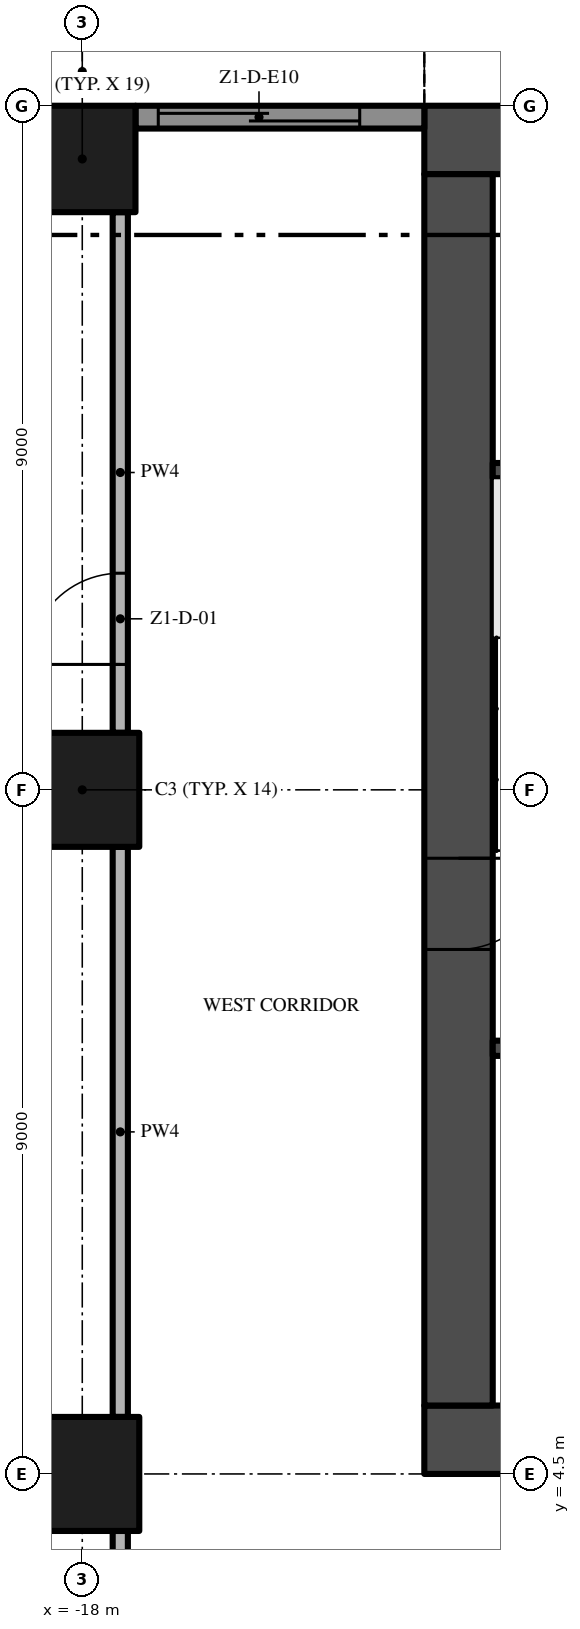
"""IFC4 building model, lengths in metres.
Left out: names, types, materials, properties, quantities, classifications, styles, units other than length and angle.
Written with IfcOpenShell. Run it as: python <this file> out.ifc"""

import sys

from ifc_helpers import new_model, si_unit, direction, frame, frame_2d, origin, origin_2d, place, context, subcontext, project, spatial, polyline, rectangle, outline, extrude, element, fill, save


model = new_model("IFC4")
c1 = context("Model", 3, precision=1e-05, world=origin(), true_north=direction((0.0, 1.0)))
c2 = subcontext(c1, "Body", "Model", "MODEL_VIEW")
j1 = project(units=[si_unit("LENGTHUNIT", "METRE"), si_unit("PLANEANGLEUNIT", "RADIAN")], contexts=[c1])
p1 = place(None, origin())
s1 = spatial("IfcSite", under=j1, at=p1, CompositionType="ELEMENT")
p2 = place(p1, origin())
s2 = spatial("IfcBuilding", under=s1, at=p2, CompositionType="ELEMENT")
p3 = place(p2, frame((0.0, 0.0, 49.2)))
s3 = spatial("IfcBuildingStorey", under=s2, at=p3, CompositionType="ELEMENT", Elevation=49.2)
p4 = place(p3, frame((-13.5, 4.95, -0.3), z_axis=(0.0, 0.0, 1.0), x_axis=(1.0, 0.0, 0.0)))
e1 = element("IfcWall", 1, at=p4, inside=s3, PredefinedType="SHEAR", context=c2, shape_type="SweptSolid", body=[
    extrude(rectangle(XDim=27.0, YDim=0.9, at=frame_2d((13.5, 0.0))), origin(), (0.0, 0.0, 1.0), 3.8),
])
p5 = place(p4, frame((12.0, 0.0, 0.3)))
e2 = element("IfcOpeningElement", 2, at=p5, cuts=e1, PredefinedType="OPENING", context=c2, shape_type="SweptSolid", body=[
    extrude(rectangle(XDim=3.0, YDim=2.4, at=frame_2d((1.5, 1.2))), frame((0.0, 0.46, 0.0), z_axis=(0.0, -1.0, 0.0), x_axis=(1.0, 0.0, 0.0)), (0.0, 0.0, 1.0), 0.92),
])
p6 = place(p4, frame((4.9, 0.0, 0.3)))
e3 = element("IfcOpeningElement", 3, at=p6, cuts=e1, PredefinedType="OPENING", context=c2, shape_type="SweptSolid", body=[
    extrude(rectangle(XDim=1.2, YDim=2.2, at=frame_2d((0.6, 1.1))), frame((0.0, 0.46, 0.0), z_axis=(0.0, -1.0, 0.0), x_axis=(1.0, 0.0, 0.0)), (0.0, 0.0, 1.0), 0.92),
])
p7 = place(p4, frame((20.75, 0.0, 0.3)))
e4 = element("IfcOpeningElement", 4, at=p7, cuts=e1, PredefinedType="OPENING", context=c2, shape_type="SweptSolid", body=[
    extrude(rectangle(XDim=1.5, YDim=2.2, at=frame_2d((0.75, 1.1))), frame((0.0, 0.46, 0.0), z_axis=(0.0, -1.0, 0.0), x_axis=(1.0, 0.0, 0.0)), (0.0, 0.0, 1.0), 0.92),
])
p8 = place(p4, frame((17.4, 0.0, 0.3)))
e5 = element("IfcOpeningElement", 5, at=p8, cuts=e1, PredefinedType="OPENING", context=c2, shape_type="SweptSolid", body=[
    extrude(rectangle(XDim=1.2, YDim=2.2, at=frame_2d((0.6, 1.1))), frame((0.0, 0.46, 0.0), z_axis=(0.0, -1.0, 0.0), x_axis=(1.0, 0.0, 0.0)), (0.0, 0.0, 1.0), 0.92),
])
p9 = place(p3, frame((13.5, 22.05, -0.3), z_axis=(0.0, 0.0, 1.0), x_axis=(-1.0, 0.0, 0.0)))
e6 = element("IfcWall", 6, at=p9, inside=s3, PredefinedType="SHEAR", context=c2, shape_type="SweptSolid", body=[
    extrude(rectangle(XDim=27.0, YDim=0.9, at=frame_2d((13.5, 0.0))), origin(), (0.0, 0.0, 1.0), 3.8),
])
p10 = place(p3, frame((-13.05, 21.6, -0.3), z_axis=(0.0, 0.0, 1.0), x_axis=(0.0, -1.0, 0.0)))
e7 = element("IfcWall", 7, at=p10, inside=s3, PredefinedType="SHEAR", context=c2, shape_type="SweptSolid", body=[
    extrude(rectangle(XDim=16.2, YDim=0.9, at=frame_2d((8.1, 0.0))), origin(), (0.0, 0.0, 1.0), 3.8),
])
p11 = place(p10, frame((9.0, 0.0, 0.3)))
e8 = element("IfcOpeningElement", 8, at=p11, cuts=e7, PredefinedType="OPENING", context=c2, shape_type="SweptSolid", body=[
    extrude(rectangle(XDim=1.2, YDim=2.2, at=frame_2d((0.6, 1.1))), frame((0.0, 0.46, 0.0), z_axis=(0.0, -1.0, 0.0), x_axis=(1.0, 0.0, 0.0)), (0.0, 0.0, 1.0), 0.92),
])
p12 = place(p3, frame((-18.0, 13.5, 0.0), z_axis=(0.0, 0.0, 1.0), x_axis=(1.0, 0.0, 0.0)))
e9 = element("IfcColumn", 9, at=p12, inside=s3, PredefinedType="COLUMN", context=c2, shape_type="SweptSolid", body=[
    extrude(rectangle(XDim=1.5, YDim=1.5, at=origin_2d()), origin(), (0.0, 0.0, 1.0), 3.5),
])
p13 = place(p3, frame((-18.0, 21.8, 0.0), z_axis=(0.0, 0.0, 1.0), x_axis=(1.0, 0.0, 0.0)))
e10 = element("IfcColumn", 10, at=p13, inside=s3, PredefinedType="COLUMN", context=c2, shape_type="SweptSolid", body=[
    extrude(rectangle(XDim=1.4, YDim=1.4, at=origin_2d()), origin(), (0.0, 0.0, 1.0), 3.5),
])
p14 = place(p3, frame((-18.0, 4.5, 0.0), z_axis=(0.0, 0.0, 1.0), x_axis=(1.0, 0.0, 0.0)))
e11 = element("IfcColumn", 11, at=p14, inside=s3, PredefinedType="COLUMN", context=c2, shape_type="SweptSolid", body=[
    extrude(rectangle(XDim=1.5, YDim=1.5, at=origin_2d()), origin(), (0.0, 0.0, 1.0), 3.5),
])
p15 = place(p3, frame((-17.3, 22.35, 0.0), z_axis=(0.0, 0.0, 1.0), x_axis=(1.0, 0.0, 0.0)))
e12 = element("IfcWall", 12, at=p15, inside=s3, PredefinedType="SOLIDWALL", context=c2, shape_type="SweptSolid", body=[
    extrude(rectangle(XDim=3.8, YDim=0.3, at=frame_2d((1.9, 0.0))), origin(), (0.0, 0.0, 1.0), 3.5),
])
p16 = place(p15, frame((0.3, 0.0, 0.0)))
e13 = element("IfcOpeningElement", 13, at=p16, cuts=e12, PredefinedType="OPENING", context=c2, shape_type="SweptSolid", body=[
    extrude(rectangle(XDim=2.65, YDim=2.4, at=frame_2d((1.325, 1.2))), frame((0.0, 0.16, 0.0), z_axis=(0.0, -1.0, 0.0), x_axis=(1.0, 0.0, 0.0)), (0.0, 0.0, 1.0), 0.32),
])
p17 = place(p3, origin())
e14 = element("IfcWall", 14, at=p17, inside=s3, PredefinedType="USERDEFINED", context=c2, shape_type="SweptSolid", body=[
    extrude(outline(polyline([(-13.5, 25.149), (-15.0, 25.485), (-15.375, 25.5), (-16.5, 25.369), (-18.0, 24.845), (-19.5, 24.112), (-21.0, 23.451), (-22.5, 23.115), (-22.445, 22.871), (-20.921, 23.213), (-19.395, 23.885), (-17.904, 24.614), (-16.444, 25.124), (-15.365, 25.249), (-15.033, 25.236), (-13.555, 24.905), (-13.5, 25.149)])), origin(), (0.0, 0.0, 1.0), 0.9),
])
for number, where, z_axis, x_axis in (
    (15, (-12.6, 10.1, 0.0), (0.0, 0.0, 1.0), (1.0, 0.0, 0.0)),
    (16, (-12.6, 17.7, 0.0), (0.0, 0.0, 1.0), (1.0, 0.0, 0.0)),
):
    element("IfcWall", number, at=place(p3, frame(where, z_axis=z_axis, x_axis=x_axis)), inside=s3, PredefinedType="SHEAR", context=c2, shape_type="SweptSolid", body=[
        extrude(rectangle(XDim=2.95, YDim=0.2, at=frame_2d((1.475, 0.0))), origin(), (0.0, 0.0, 1.0), 3.5),
    ])
p18 = place(p3, frame((-17.5, -0.2, 0.0), z_axis=(0.0, 0.0, 1.0), x_axis=(0.0, 1.0, 0.0)))
e17 = element("IfcWall", 17, at=p18, inside=s3, PredefinedType="PARTITIONING", context=c2, shape_type="SweptSolid", body=[
    extrude(rectangle(XDim=3.95, YDim=0.2, at=frame_2d((1.975, 0.0))), origin(), (0.0, 0.0, 1.0), 3.5),
])
p19 = place(p3, frame((-17.5, 5.25, 0.0), z_axis=(0.0, 0.0, 1.0), x_axis=(0.0, 1.0, 0.0)))
e18 = element("IfcWall", 18, at=p19, inside=s3, PredefinedType="PARTITIONING", context=c2, shape_type="SweptSolid", body=[
    extrude(rectangle(XDim=7.5, YDim=0.2, at=frame_2d((3.75, 0.0))), origin(), (0.0, 0.0, 1.0), 3.5),
])
p20 = place(p3, frame((-17.5, 14.25, 0.0), z_axis=(0.0, 0.0, 1.0), x_axis=(0.0, 1.0, 0.0)))
e19 = element("IfcWall", 19, at=p20, inside=s3, PredefinedType="PARTITIONING", context=c2, shape_type="SweptSolid", body=[
    extrude(rectangle(XDim=6.85, YDim=0.2, at=frame_2d((3.425, 0.0))), origin(), (0.0, 0.0, 1.0), 3.5),
])
p21 = place(p20, frame((0.9, 0.0, 0.0)))
e20 = element("IfcOpeningElement", 20, at=p21, cuts=e19, PredefinedType="OPENING", context=c2, shape_type="SweptSolid", body=[
    extrude(rectangle(XDim=1.2, YDim=2.4, at=frame_2d((0.6, 1.2))), frame((0.0, 0.11, 0.0), z_axis=(0.0, -1.0, 0.0), x_axis=(1.0, 0.0, 0.0)), (0.0, 0.0, 1.0), 0.22),
])
p22 = place(p16, origin())
e21 = element("IfcDoor", 21, at=p22, inside=s3, OperationType="SINGLE_SWING_LEFT", PredefinedType="DOOR", context=c2, shape_type="SweptSolid", body=[
    extrude(rectangle(XDim=2.65, YDim=2.4, at=frame_2d((1.325, 1.2))), frame((0.0, 0.025, 0.0), z_axis=(0.0, -1.0, 0.0), x_axis=(1.0, 0.0, 0.0)), (0.0, 0.0, 1.0), 0.05),
])
fill(e13, e21)
p23 = place(p11, frame((1.2, 0.0, 0.0), z_axis=(0.0, 0.0, 1.0), x_axis=(-1.0, 0.0, 0.0)))
e22 = element("IfcDoor", 22, at=p23, inside=s3, OperationType="SINGLE_SWING_RIGHT", PredefinedType="DOOR", context=c2, shape_type="SweptSolid", body=[
    extrude(rectangle(XDim=1.2, YDim=2.2, at=frame_2d((0.6, 1.1))), frame((0.0, 0.025, 0.0), z_axis=(0.0, -1.0, 0.0), x_axis=(1.0, 0.0, 0.0)), (0.0, 0.0, 1.0), 0.05),
])
fill(e8, e22)
p24 = place(p21, origin())
e23 = element("IfcDoor", 23, at=p24, inside=s3, OperationType="SINGLE_SWING_LEFT", PredefinedType="DOOR", context=c2, shape_type="SweptSolid", body=[
    extrude(rectangle(XDim=1.2, YDim=2.4, at=frame_2d((0.6, 1.2))), frame((0.0, 0.025, 0.0), z_axis=(0.0, -1.0, 0.0), x_axis=(1.0, 0.0, 0.0)), (0.0, 0.0, 1.0), 0.05),
])
fill(e20, e23)
save(model, sys.argv[1])
